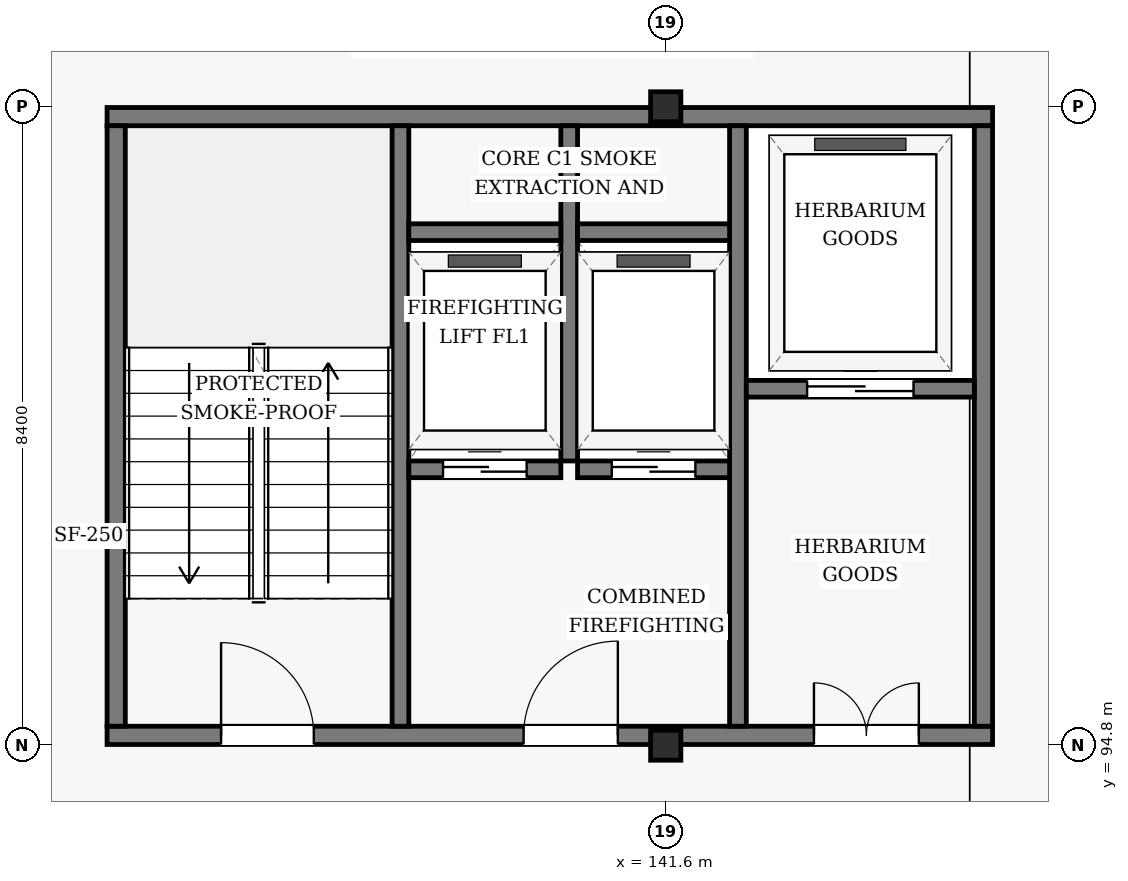
"""IFC4 building model, lengths in metres.
Left out: names, types, materials, properties, quantities, classifications, styles, units other than length and angle.
Written with IfcOpenShell. Run it as: python <this file> out.ifc"""

import sys

from ifc_helpers import new_model, si_unit, direction, frame, frame_2d, origin, origin_2d, place, context, subcontext, project, spatial, rectangle, i_section, extrude, element, fill, save


model = new_model("IFC4")
c1 = context("Model", 3, precision=1e-05, world=origin(), true_north=direction((0.0, 1.0)))
c2 = subcontext(c1, "Body", "Model", "MODEL_VIEW")
j1 = project(units=[si_unit("LENGTHUNIT", "METRE"), si_unit("PLANEANGLEUNIT", "RADIAN")], contexts=[c1])
p1 = place(None, origin())
s1 = spatial("IfcSite", under=j1, at=p1, CompositionType="ELEMENT")
p2 = place(p1, origin())
s2 = spatial("IfcBuilding", under=s1, at=p2, CompositionType="ELEMENT")
p3 = place(p2, frame((0.0, 0.0, 24.6)))
s3 = spatial("IfcBuildingStorey", under=s2, at=p3, CompositionType="ELEMENT", Elevation=24.6)
for number, where, z_axis, x_axis in (
    (1, (141.6, 94.8, 0.0), (0.0, 0.0, 1.0), (1.0, 0.0, 0.0)),
    (2, (141.6, 103.2, 0.0), (0.0, 0.0, 1.0), (1.0, 0.0, 0.0)),
):
    element("IfcColumn", number, at=place(p3, frame(where, z_axis=z_axis, x_axis=x_axis)), inside=s3, PredefinedType="COLUMN", context=c2, shape_type="SweptSolid", body=[
        extrude(i_section(OverallWidth=0.398, OverallDepth=0.394, WebThickness=0.011, FlangeThickness=0.018, FilletRadius=0.022, at=origin_2d()), origin(), (0.0, 0.0, 1.0), 3.6),
    ])
p4 = place(p3, frame((134.25, 94.93, 0.0), z_axis=(0.0, 0.0, 1.0), x_axis=(1.0, 0.0, 0.0)))
e3 = element("IfcWall", 3, at=p4, inside=s3, PredefinedType="SHEAR", context=c2, shape_type="SweptSolid", body=[
    extrude(rectangle(XDim=11.65, YDim=0.24, at=frame_2d((5.825, 0.0))), origin(), (0.0, 0.0, 1.0), 3.345),
])
p5 = place(p4, frame((1.5, 0.0, 0.0)))
e4 = element("IfcOpeningElement", 4, at=p5, cuts=e3, PredefinedType="OPENING", context=c2, shape_type="SweptSolid", body=[
    extrude(rectangle(XDim=1.22, YDim=2.18, at=frame_2d((0.61, 1.09))), frame((0.0, 0.13, 0.0), z_axis=(0.0, -1.0, 0.0), x_axis=(1.0, 0.0, 0.0)), (0.0, 0.0, 1.0), 0.26),
])
p6 = place(p4, frame((5.48, 0.0, 0.0)))
e5 = element("IfcOpeningElement", 5, at=p6, cuts=e3, PredefinedType="OPENING", context=c2, shape_type="SweptSolid", body=[
    extrude(rectangle(XDim=1.24, YDim=2.15, at=frame_2d((0.62, 1.075))), frame((0.0, 0.13, 0.0), z_axis=(0.0, -1.0, 0.0), x_axis=(1.0, 0.0, 0.0)), (0.0, 0.0, 1.0), 0.26),
])
p7 = place(p4, frame((9.3, 0.0, 0.0)))
e6 = element("IfcOpeningElement", 6, at=p7, cuts=e3, PredefinedType="OPENING", context=c2, shape_type="SweptSolid", body=[
    extrude(rectangle(XDim=1.38, YDim=2.15, at=frame_2d((0.69, 1.075))), frame((0.0, 0.13, 0.0), z_axis=(0.0, -1.0, 0.0), x_axis=(1.0, 0.0, 0.0)), (0.0, 0.0, 1.0), 0.26),
])
p8 = place(p3, frame((134.25, 103.07, 0.0), z_axis=(0.0, 0.0, 1.0), x_axis=(1.0, 0.0, 0.0)))
e7 = element("IfcWall", 7, at=p8, inside=s3, PredefinedType="SHEAR", context=c2, shape_type="SweptSolid", body=[
    extrude(rectangle(XDim=11.65, YDim=0.24, at=frame_2d((5.825, 0.0))), origin(), (0.0, 0.0, 1.0), 3.345),
])
p9 = place(p3, frame((134.37, 95.05, 0.0), z_axis=(0.0, 0.0, 1.0), x_axis=(0.0, 1.0, 0.0)))
e8 = element("IfcWall", 8, at=p9, inside=s3, PredefinedType="SHEAR", context=c2, shape_type="SweptSolid", body=[
    extrude(rectangle(XDim=7.9, YDim=0.24, at=frame_2d((3.95, 0.0))), origin(), (0.0, 0.0, 1.0), 3.345),
])
p10 = place(p3, frame((138.11, 95.05, 0.0), z_axis=(0.0, 0.0, 1.0), x_axis=(0.0, 1.0, 0.0)))
e9 = element("IfcWall", 9, at=p10, inside=s3, PredefinedType="SHEAR", context=c2, shape_type="SweptSolid", body=[
    extrude(rectangle(XDim=7.9, YDim=0.22, at=frame_2d((3.95, 0.0))), origin(), (0.0, 0.0, 1.0), 3.345),
])
p11 = place(p3, frame((140.33, 98.54, 0.0), z_axis=(0.0, 0.0, 1.0), x_axis=(0.0, 1.0, 0.0)))
e10 = element("IfcWall", 10, at=p11, inside=s3, PredefinedType="SHEAR", context=c2, shape_type="SweptSolid", body=[
    extrude(rectangle(XDim=4.41, YDim=0.22, at=frame_2d((2.205, 0.0))), origin(), (0.0, 0.0, 1.0), 3.345),
])
p12 = place(p3, frame((142.55, 95.05, 0.0), z_axis=(0.0, 0.0, 1.0), x_axis=(0.0, 1.0, 0.0)))
e11 = element("IfcWall", 11, at=p12, inside=s3, PredefinedType="SHEAR", context=c2, shape_type="SweptSolid", body=[
    extrude(rectangle(XDim=7.9, YDim=0.22, at=frame_2d((3.95, 0.0))), origin(), (0.0, 0.0, 1.0), 3.345),
])
p13 = place(p3, frame((145.78, 95.05, 0.0), z_axis=(0.0, 0.0, 1.0), x_axis=(0.0, 1.0, 0.0)))
e12 = element("IfcWall", 12, at=p13, inside=s3, PredefinedType="SHEAR", context=c2, shape_type="SweptSolid", body=[
    extrude(rectangle(XDim=7.9, YDim=0.24, at=frame_2d((3.95, 0.0))), origin(), (0.0, 0.0, 1.0), 3.345),
])
p14 = place(p3, frame((138.22, 98.43, 0.0), z_axis=(0.0, 0.0, 1.0), x_axis=(1.0, 0.0, 0.0)))
e13 = element("IfcWall", 13, at=p14, inside=s3, PredefinedType="SHEAR", context=c2, shape_type="SweptSolid", body=[
    extrude(rectangle(XDim=2.0, YDim=0.22, at=frame_2d((1.0, 0.0))), origin(), (0.0, 0.0, 1.0), 3.345),
])
p15 = place(p14, frame((0.45, 0.0, 0.0)))
e14 = element("IfcOpeningElement", 14, at=p15, cuts=e13, PredefinedType="OPENING", context=c2, shape_type="SweptSolid", body=[
    extrude(rectangle(XDim=1.1, YDim=2.15, at=frame_2d((0.55, 1.075))), frame((0.0, 0.12, 0.0), z_axis=(0.0, -1.0, 0.0), x_axis=(1.0, 0.0, 0.0)), (0.0, 0.0, 1.0), 0.24),
])
p16 = place(p3, frame((140.44, 98.43, 0.0), z_axis=(0.0, 0.0, 1.0), x_axis=(1.0, 0.0, 0.0)))
e15 = element("IfcWall", 15, at=p16, inside=s3, PredefinedType="SHEAR", context=c2, shape_type="SweptSolid", body=[
    extrude(rectangle(XDim=2.0, YDim=0.22, at=frame_2d((1.0, 0.0))), origin(), (0.0, 0.0, 1.0), 3.345),
])
p17 = place(p16, frame((0.45, 0.0, 0.0)))
e16 = element("IfcOpeningElement", 16, at=p17, cuts=e15, PredefinedType="OPENING", context=c2, shape_type="SweptSolid", body=[
    extrude(rectangle(XDim=1.1, YDim=2.15, at=frame_2d((0.55, 1.075))), frame((0.0, 0.12, 0.0), z_axis=(0.0, -1.0, 0.0), x_axis=(1.0, 0.0, 0.0)), (0.0, 0.0, 1.0), 0.24),
])
for number, where, z_axis, x_axis in (
    (17, (138.22, 101.55, 0.0), (0.0, 0.0, 1.0), (1.0, 0.0, 0.0)),
    (18, (140.44, 101.55, 0.0), (0.0, 0.0, 1.0), (1.0, 0.0, 0.0)),
):
    element("IfcWall", number, at=place(p3, frame(where, z_axis=z_axis, x_axis=x_axis)), inside=s3, PredefinedType="SHEAR", context=c2, shape_type="SweptSolid", body=[
        extrude(rectangle(XDim=2.0, YDim=0.22, at=frame_2d((1.0, 0.0))), origin(), (0.0, 0.0, 1.0), 3.345),
    ])
p18 = place(p3, frame((142.66, 99.49, 0.0), z_axis=(0.0, 0.0, 1.0), x_axis=(1.0, 0.0, 0.0)))
e19 = element("IfcWall", 19, at=p18, inside=s3, PredefinedType="SHEAR", context=c2, shape_type="SweptSolid", body=[
    extrude(rectangle(XDim=3.0, YDim=0.22, at=frame_2d((1.5, 0.0))), origin(), (0.0, 0.0, 1.0), 3.345),
])
p19 = place(p18, frame((0.8, 0.0, 0.0)))
e20 = element("IfcOpeningElement", 20, at=p19, cuts=e19, PredefinedType="OPENING", context=c2, shape_type="SweptSolid", body=[
    extrude(rectangle(XDim=1.4, YDim=2.2, at=frame_2d((0.7, 1.1))), frame((0.0, 0.12, 0.0), z_axis=(0.0, -1.0, 0.0), x_axis=(1.0, 0.0, 0.0)), (0.0, 0.0, 1.0), 0.24),
])
p20 = place(p5, origin())
e21 = element("IfcDoor", 21, at=p20, inside=s3, OperationType="SINGLE_SWING_LEFT", PredefinedType="DOOR", context=c2, shape_type="SweptSolid", body=[
    extrude(rectangle(XDim=1.22, YDim=2.18, at=frame_2d((0.61, 1.09))), frame((0.0, 0.025, 0.0), z_axis=(0.0, -1.0, 0.0), x_axis=(1.0, 0.0, 0.0)), (0.0, 0.0, 1.0), 0.05),
])
fill(e4, e21)
p21 = place(p6, frame((1.24, 0.0, 0.0), z_axis=(0.0, 0.0, 1.0), x_axis=(-1.0, 0.0, 0.0)))
e22 = element("IfcDoor", 22, at=p21, inside=s3, OperationType="SINGLE_SWING_RIGHT", PredefinedType="DOOR", context=c2, shape_type="SweptSolid", body=[
    extrude(rectangle(XDim=1.24, YDim=2.15, at=frame_2d((0.62, 1.075))), frame((0.0, 0.025, 0.0), z_axis=(0.0, -1.0, 0.0), x_axis=(1.0, 0.0, 0.0)), (0.0, 0.0, 1.0), 0.05),
])
fill(e5, e22)
p22 = place(p7, frame((1.38, 0.0, 0.0), z_axis=(0.0, 0.0, 1.0), x_axis=(-1.0, 0.0, 0.0)))
e23 = element("IfcDoor", 23, at=p22, inside=s3, OperationType="DOUBLE_DOOR_SINGLE_SWING", PredefinedType="DOOR", context=c2, shape_type="SweptSolid", body=[
    extrude(rectangle(XDim=1.38, YDim=2.15, at=frame_2d((0.69, 1.075))), frame((0.0, 0.025, 0.0), z_axis=(0.0, -1.0, 0.0), x_axis=(1.0, 0.0, 0.0)), (0.0, 0.0, 1.0), 0.05),
])
fill(e6, e23)
p23 = place(p15, origin())
e24 = element("IfcDoor", 24, at=p23, inside=s3, OperationType="SLIDING_TO_LEFT", PredefinedType="DOOR", context=c2, shape_type="SweptSolid", body=[
    extrude(rectangle(XDim=1.1, YDim=2.15, at=frame_2d((0.55, 1.075))), frame((0.0, 0.025, 0.0), z_axis=(0.0, -1.0, 0.0), x_axis=(1.0, 0.0, 0.0)), (0.0, 0.0, 1.0), 0.05),
])
fill(e14, e24)
p24 = place(p17, origin())
e25 = element("IfcDoor", 25, at=p24, inside=s3, OperationType="SLIDING_TO_LEFT", PredefinedType="DOOR", context=c2, shape_type="SweptSolid", body=[
    extrude(rectangle(XDim=1.1, YDim=2.15, at=frame_2d((0.55, 1.075))), frame((0.0, 0.025, 0.0), z_axis=(0.0, -1.0, 0.0), x_axis=(1.0, 0.0, 0.0)), (0.0, 0.0, 1.0), 0.05),
])
fill(e16, e25)
p25 = place(p19, origin())
e26 = element("IfcDoor", 26, at=p25, inside=s3, OperationType="SLIDING_TO_LEFT", PredefinedType="DOOR", context=c2, shape_type="SweptSolid", body=[
    extrude(rectangle(XDim=1.4, YDim=2.2, at=frame_2d((0.7, 1.1))), frame((0.0, 0.025, 0.0), z_axis=(0.0, -1.0, 0.0), x_axis=(1.0, 0.0, 0.0)), (0.0, 0.0, 1.0), 0.05),
])
fill(e20, e26)
save(model, sys.argv[1])
